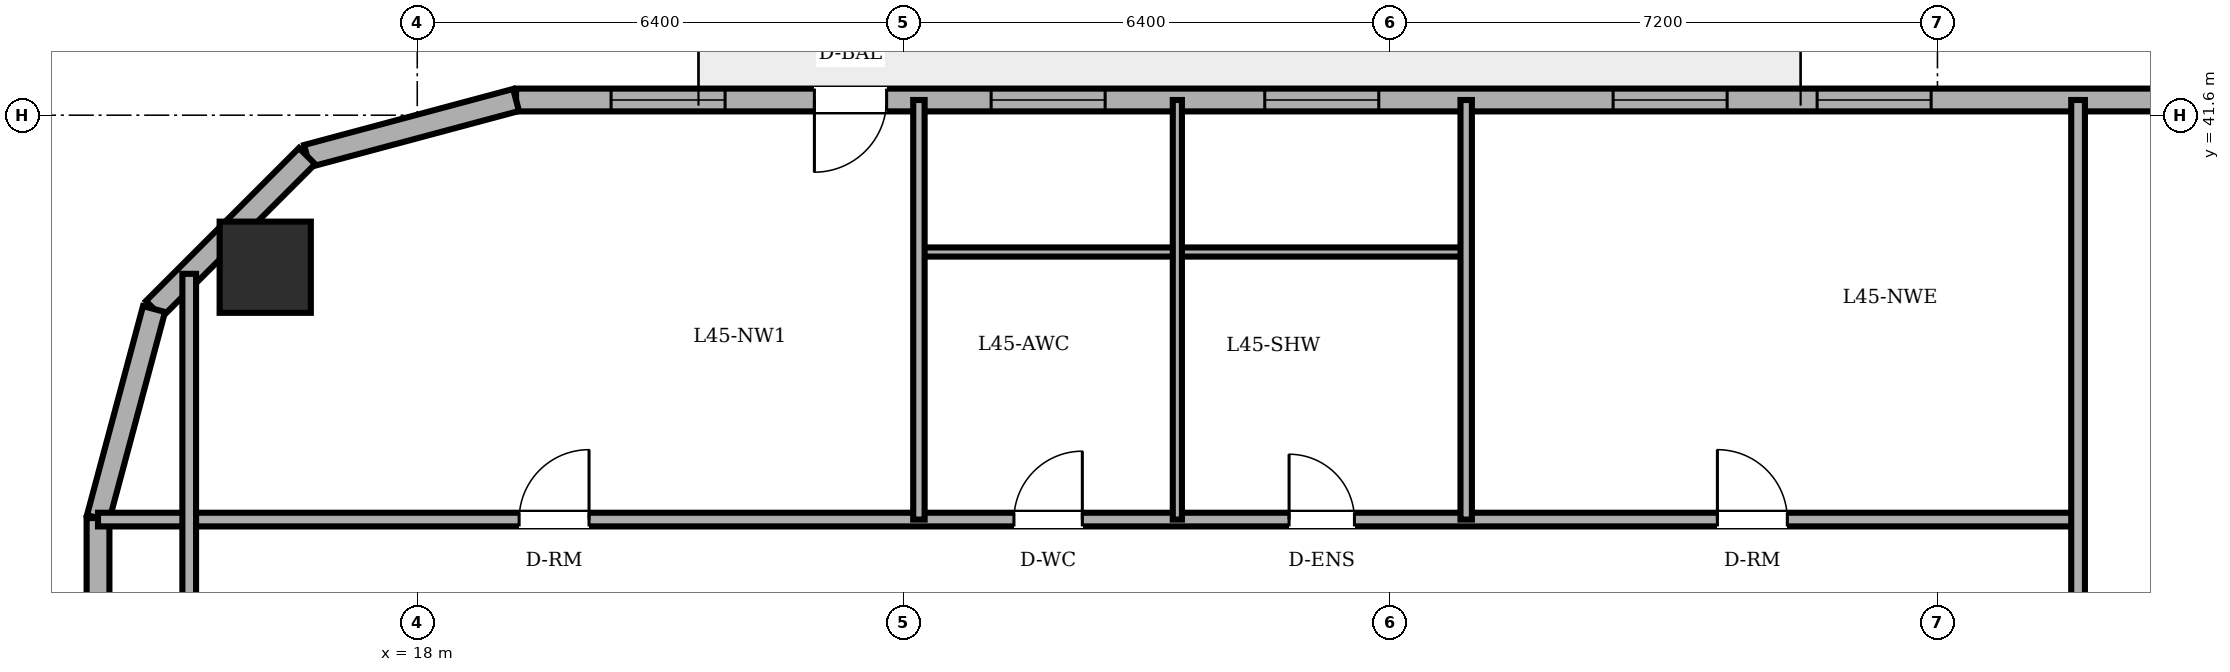
"""IFC4 building model, lengths in metres.
Left out: names, types, materials, properties, quantities, classifications, styles, units other than length and angle.
Written with IfcOpenShell. Run it as: python <this file> out.ifc"""

import sys

from ifc_helpers import new_model, si_unit, direction, frame, frame_2d, origin, origin_2d, place, context, subcontext, project, spatial, rectangle, circle, extrude, element, fill, save


model = new_model("IFC4")
c1 = context("Model", 3, precision=1e-05, world=origin(), true_north=direction((0.0, 1.0)))
c2 = subcontext(c1, "Body", "Model", "MODEL_VIEW")
j1 = project(units=[si_unit("LENGTHUNIT", "METRE"), si_unit("PLANEANGLEUNIT", "RADIAN")], contexts=[c1])
p1 = place(None, origin())
s1 = spatial("IfcSite", under=j1, at=p1, CompositionType="ELEMENT")
p2 = place(p1, origin())
s2 = spatial("IfcBuilding", under=s1, at=p2, CompositionType="ELEMENT")
p3 = place(p2, frame((0.0, 0.0, 172.6)))
s3 = spatial("IfcBuildingStorey", under=s2, at=p3, CompositionType="ELEMENT", Elevation=172.6)
p4 = place(p3, frame((16.0, 39.6, 0.0), z_axis=(0.0, 0.0, 1.0), x_axis=(1.0, 0.0, 0.0)))
e1 = element("IfcColumn", 1, at=p4, inside=s3, PredefinedType="COLUMN", context=c2, shape_type="SweptSolid", body=[
    extrude(circle(Radius=0.6, at=origin_2d()), origin(), (0.0, 0.0, 1.0), 3.6),
])
p5 = place(p3, frame((49.582, 41.8, 0.0), z_axis=(0.0, 0.0, 1.0), x_axis=(-1.0, 0.0, 0.0)))
e2 = element("IfcWall", 2, at=p5, inside=s3, PredefinedType="SOLIDWALL", context=c2, shape_type="SweptSolid", body=[
    extrude(rectangle(XDim=30.282, YDim=0.3, at=frame_2d((15.141, 0.0))), origin(), (0.0, 0.0, 1.0), 3.4),
])
p6 = place(p5, frame((25.407, 0.0, 0.0)))
e3 = element("IfcOpeningElement", 3, at=p6, cuts=e2, PredefinedType="OPENING", context=c2, shape_type="SweptSolid", body=[
    extrude(rectangle(XDim=0.95, YDim=2.2, at=frame_2d((0.475, 1.1))), frame((0.0, 0.16, 0.0), z_axis=(0.0, -1.0, 0.0), x_axis=(1.0, 0.0, 0.0)), (0.0, 0.0, 1.0), 0.32),
])
p7 = place(p5, frame((2.727, 0.0, 0.85)))
e4 = element("IfcOpeningElement", 4, at=p7, cuts=e2, PredefinedType="OPENING", context=c2, shape_type="SweptSolid", body=[
    extrude(rectangle(XDim=1.5, YDim=1.55, at=frame_2d((0.75, 0.775))), frame((0.0, 0.16, 0.0), z_axis=(0.0, -1.0, 0.0), x_axis=(1.0, 0.0, 0.0)), (0.0, 0.0, 1.0), 0.32),
])
p8 = place(p5, frame((5.855, 0.0, 0.85)))
e5 = element("IfcOpeningElement", 5, at=p8, cuts=e2, PredefinedType="OPENING", context=c2, shape_type="SweptSolid", body=[
    extrude(rectangle(XDim=1.5, YDim=1.55, at=frame_2d((0.75, 0.775))), frame((0.0, 0.16, 0.0), z_axis=(0.0, -1.0, 0.0), x_axis=(1.0, 0.0, 0.0)), (0.0, 0.0, 1.0), 0.32),
])
p9 = place(p5, frame((11.665, 0.0, 0.85)))
e6 = element("IfcOpeningElement", 6, at=p9, cuts=e2, PredefinedType="OPENING", context=c2, shape_type="SweptSolid", body=[
    extrude(rectangle(XDim=1.5, YDim=1.55, at=frame_2d((0.75, 0.775))), frame((0.0, 0.16, 0.0), z_axis=(0.0, -1.0, 0.0), x_axis=(1.0, 0.0, 0.0)), (0.0, 0.0, 1.0), 0.32),
])
p10 = place(p5, frame((14.349, 0.0, 0.85)))
e7 = element("IfcOpeningElement", 7, at=p10, cuts=e2, PredefinedType="OPENING", context=c2, shape_type="SweptSolid", body=[
    extrude(rectangle(XDim=1.5, YDim=1.55, at=frame_2d((0.75, 0.775))), frame((0.0, 0.16, 0.0), z_axis=(0.0, -1.0, 0.0), x_axis=(1.0, 0.0, 0.0)), (0.0, 0.0, 1.0), 0.32),
])
p11 = place(p5, frame((18.932, 0.0, 0.85)))
e8 = element("IfcOpeningElement", 8, at=p11, cuts=e2, PredefinedType="OPENING", context=c2, shape_type="SweptSolid", body=[
    extrude(rectangle(XDim=1.5, YDim=1.55, at=frame_2d((0.75, 0.775))), frame((0.0, 0.16, 0.0), z_axis=(0.0, -1.0, 0.0), x_axis=(1.0, 0.0, 0.0)), (0.0, 0.0, 1.0), 0.32),
])
p12 = place(p5, frame((22.532, 0.0, 0.85)))
e9 = element("IfcOpeningElement", 9, at=p12, cuts=e2, PredefinedType="OPENING", context=c2, shape_type="SweptSolid", body=[
    extrude(rectangle(XDim=1.5, YDim=1.55, at=frame_2d((0.75, 0.775))), frame((0.0, 0.16, 0.0), z_axis=(0.0, -1.0, 0.0), x_axis=(1.0, 0.0, 0.0)), (0.0, 0.0, 1.0), 0.32),
])
p13 = place(p5, frame((27.532, 0.0, 0.85)))
e10 = element("IfcOpeningElement", 10, at=p13, cuts=e2, PredefinedType="OPENING", context=c2, shape_type="SweptSolid", body=[
    extrude(rectangle(XDim=1.5, YDim=1.55, at=frame_2d((0.75, 0.775))), frame((0.0, 0.16, 0.0), z_axis=(0.0, -1.0, 0.0), x_axis=(1.0, 0.0, 0.0)), (0.0, 0.0, 1.0), 0.32),
])
p14 = place(p3, frame((19.3, 41.8, 0.0), z_axis=(0.0, 0.0, 1.0), x_axis=(-0.965908238586, -0.258884674387, 0.0)))
e11 = element("IfcWall", 11, at=p14, inside=s3, PredefinedType="SOLIDWALL", context=c2, shape_type="SweptSolid", body=[
    extrude(rectangle(XDim=2.847, YDim=0.3, at=frame_2d((1.424, 0.0))), origin(), (0.0, 0.0, 1.0), 3.4),
])
p15 = place(p3, frame((16.55, 41.063, 0.0), z_axis=(0.0, 0.0, 1.0), x_axis=(-0.707106781187, -0.707106781187, 0.0)))
e12 = element("IfcWall", 12, at=p15, inside=s3, PredefinedType="SOLIDWALL", context=c2, shape_type="SweptSolid", body=[
    extrude(rectangle(XDim=2.847, YDim=0.3, at=frame_2d((1.423, 0.0))), origin(), (0.0, 0.0, 1.0), 3.4),
])
p16 = place(p3, frame((14.537, 39.05, 0.0), z_axis=(0.0, 0.0, 1.0), x_axis=(-0.258884674387, -0.965908238586, 0.0)))
e13 = element("IfcWall", 13, at=p16, inside=s3, PredefinedType="SOLIDWALL", context=c2, shape_type="SweptSolid", body=[
    extrude(rectangle(XDim=2.847, YDim=0.3, at=frame_2d((1.424, 0.0))), origin(), (0.0, 0.0, 1.0), 3.4),
])
p17 = place(p3, frame((13.8, 36.3, 0.0), z_axis=(0.0, 0.0, 1.0), x_axis=(0.0, -1.0, 0.0)))
e14 = element("IfcWall", 14, at=p17, inside=s3, PredefinedType="SOLIDWALL", context=c2, shape_type="SweptSolid", body=[
    extrude(rectangle(XDim=24.6, YDim=0.3, at=frame_2d((12.3, 0.0))), origin(), (0.0, 0.0, 1.0), 3.4),
])
p18 = place(p17, frame((5.003, 0.0, 0.85)))
e15 = element("IfcOpeningElement", 15, at=p18, cuts=e14, PredefinedType="OPENING", context=c2, shape_type="SweptSolid", body=[
    extrude(rectangle(XDim=1.5, YDim=1.55, at=frame_2d((0.75, 0.775))), frame((0.0, 0.16, 0.0), z_axis=(0.0, -1.0, 0.0), x_axis=(1.0, 0.0, 0.0)), (0.0, 0.0, 1.0), 0.32),
])
p19 = place(p17, frame((8.277, 0.0, 0.85)))
e16 = element("IfcOpeningElement", 16, at=p19, cuts=e14, PredefinedType="OPENING", context=c2, shape_type="SweptSolid", body=[
    extrude(rectangle(XDim=1.5, YDim=1.55, at=frame_2d((0.75, 0.775))), frame((0.0, 0.16, 0.0), z_axis=(0.0, -1.0, 0.0), x_axis=(1.0, 0.0, 0.0)), (0.0, 0.0, 1.0), 0.32),
])
p20 = place(p17, frame((14.823, 0.0, 0.85)))
e17 = element("IfcOpeningElement", 17, at=p20, cuts=e14, PredefinedType="OPENING", context=c2, shape_type="SweptSolid", body=[
    extrude(rectangle(XDim=1.5, YDim=1.55, at=frame_2d((0.75, 0.775))), frame((0.0, 0.16, 0.0), z_axis=(0.0, -1.0, 0.0), x_axis=(1.0, 0.0, 0.0)), (0.0, 0.0, 1.0), 0.32),
])
p21 = place(p17, frame((18.097, 0.0, 0.85)))
e18 = element("IfcOpeningElement", 18, at=p21, cuts=e14, PredefinedType="OPENING", context=c2, shape_type="SweptSolid", body=[
    extrude(rectangle(XDim=1.5, YDim=1.55, at=frame_2d((0.75, 0.775))), frame((0.0, 0.16, 0.0), z_axis=(0.0, -1.0, 0.0), x_axis=(1.0, 0.0, 0.0)), (0.0, 0.0, 1.0), 0.32),
])
p22 = place(p3, frame((13.8, 36.28, 0.0), z_axis=(0.0, 0.0, 1.0), x_axis=(1.0, 0.0, 0.0)))
e19 = element("IfcWall", 19, at=p22, inside=s3, PredefinedType="PARTITIONING", context=c2, shape_type="SweptSolid", body=[
    extrude(rectangle(XDim=26.05, YDim=0.18, at=frame_2d((13.025, 0.0))), origin(), (0.0, 0.0, 1.0), 3.4),
])
p23 = place(p22, frame((12.05, 0.0, 0.0)))
e20 = element("IfcOpeningElement", 20, at=p23, cuts=e19, PredefinedType="OPENING", context=c2, shape_type="SweptSolid", body=[
    extrude(rectangle(XDim=0.9, YDim=2.1, at=frame_2d((0.45, 1.05))), frame((0.0, 0.1, 0.0), z_axis=(0.0, -1.0, 0.0), x_axis=(1.0, 0.0, 0.0)), (0.0, 0.0, 1.0), 0.2),
])
p24 = place(p22, frame((15.67, 0.0, 0.0)))
e21 = element("IfcOpeningElement", 21, at=p24, cuts=e19, PredefinedType="OPENING", context=c2, shape_type="SweptSolid", body=[
    extrude(rectangle(XDim=0.86, YDim=2.1, at=frame_2d((0.43, 1.05))), frame((0.0, 0.1, 0.0), z_axis=(0.0, -1.0, 0.0), x_axis=(1.0, 0.0, 0.0)), (0.0, 0.0, 1.0), 0.2),
])
p25 = place(p22, frame((5.54, 0.0, 0.0)))
e22 = element("IfcOpeningElement", 22, at=p25, cuts=e19, PredefinedType="OPENING", context=c2, shape_type="SweptSolid", body=[
    extrude(rectangle(XDim=0.92, YDim=2.1, at=frame_2d((0.46, 1.05))), frame((0.0, 0.1, 0.0), z_axis=(0.0, -1.0, 0.0), x_axis=(1.0, 0.0, 0.0)), (0.0, 0.0, 1.0), 0.2),
])
p26 = place(p22, frame((21.305, 0.0, 0.0)))
e23 = element("IfcOpeningElement", 23, at=p26, cuts=e19, PredefinedType="OPENING", context=c2, shape_type="SweptSolid", body=[
    extrude(rectangle(XDim=0.92, YDim=2.1, at=frame_2d((0.46, 1.05))), frame((0.0, 0.1, 0.0), z_axis=(0.0, -1.0, 0.0), x_axis=(1.0, 0.0, 0.0)), (0.0, 0.0, 1.0), 0.2),
])
p27 = place(p3, frame((24.6, 39.8, 0.0), z_axis=(0.0, 0.0, 1.0), x_axis=(1.0, 0.0, 0.0)))
e24 = element("IfcWall", 24, at=p27, inside=s3, PredefinedType="PARTITIONING", context=c2, shape_type="SweptSolid", body=[
    extrude(rectangle(XDim=7.2, YDim=0.12, at=frame_2d((3.6, 0.0))), origin(), (0.0, 0.0, 1.0), 2.882),
])
p28 = place(p3, frame((15.0, 33.82, 0.0), z_axis=(0.0, 0.0, 1.0), x_axis=(0.0, 1.0, 0.0)))
e25 = element("IfcWall", 25, at=p28, inside=s3, PredefinedType="PARTITIONING", context=c2, shape_type="SweptSolid", body=[
    extrude(rectangle(XDim=5.693, YDim=0.18, at=frame_2d((2.846, 0.0))), origin(), (0.0, 0.0, 1.0), 3.4),
])
p29 = place(p3, frame((24.6, 36.28, 0.0), z_axis=(0.0, 0.0, 1.0), x_axis=(0.0, 1.0, 0.0)))
e26 = element("IfcWall", 26, at=p29, inside=s3, PredefinedType="PARTITIONING", context=c2, shape_type="SweptSolid", body=[
    extrude(rectangle(XDim=5.52, YDim=0.15, at=frame_2d((2.76, 0.0))), origin(), (0.0, 0.0, 1.0), 3.4),
])
p30 = place(p3, frame((28.0, 36.28, 0.0), z_axis=(0.0, 0.0, 1.0), x_axis=(0.0, 1.0, 0.0)))
e27 = element("IfcWall", 27, at=p30, inside=s3, PredefinedType="PARTITIONING", context=c2, shape_type="SweptSolid", body=[
    extrude(rectangle(XDim=5.52, YDim=0.12, at=frame_2d((2.76, 0.0))), origin(), (0.0, 0.0, 1.0), 3.4),
])
p31 = place(p3, frame((31.8, 36.28, 0.0), z_axis=(0.0, 0.0, 1.0), x_axis=(0.0, 1.0, 0.0)))
e28 = element("IfcWall", 28, at=p31, inside=s3, PredefinedType="PARTITIONING", context=c2, shape_type="SweptSolid", body=[
    extrude(rectangle(XDim=5.52, YDim=0.15, at=frame_2d((2.76, 0.0))), origin(), (0.0, 0.0, 1.0), 3.4),
])
p32 = place(p3, frame((39.85, 14.18, 0.0), z_axis=(0.0, 0.0, 1.0), x_axis=(0.0, 1.0, 0.0)))
e29 = element("IfcWall", 29, at=p32, inside=s3, PredefinedType="PARTITIONING", context=c2, shape_type="SweptSolid", body=[
    extrude(rectangle(XDim=27.62, YDim=0.18, at=frame_2d((13.81, 0.0))), origin(), (0.0, 0.0, 1.0), 3.4),
])
p33 = place(p32, frame((14.47, 0.0, 0.0)))
e30 = element("IfcOpeningElement", 30, at=p33, cuts=e29, PredefinedType="OPENING", context=c2, shape_type="SweptSolid", body=[
    extrude(rectangle(XDim=0.92, YDim=2.1, at=frame_2d((0.46, 1.05))), frame((0.0, 0.1, 0.0), z_axis=(0.0, -1.0, 0.0), x_axis=(1.0, 0.0, 0.0)), (0.0, 0.0, 1.0), 0.2),
])
p34 = place(p6, origin())
e31 = element("IfcDoor", 31, at=p34, inside=s3, OperationType="SINGLE_SWING_RIGHT", PredefinedType="DOOR", context=c2, shape_type="SweptSolid", body=[
    extrude(rectangle(XDim=0.95, YDim=2.2, at=frame_2d((0.475, 1.1))), frame((0.0, 0.025, 0.0), z_axis=(0.0, -1.0, 0.0), x_axis=(1.0, 0.0, 0.0)), (0.0, 0.0, 1.0), 0.05),
])
fill(e3, e31)
p35 = place(p9, origin())
e32 = element("IfcWindow", 32, at=p35, inside=s3, PartitioningType="DOUBLE_PANEL_VERTICAL", PredefinedType="WINDOW", context=c2, shape_type="SweptSolid", body=[
    extrude(rectangle(XDim=1.5, YDim=1.55, at=frame_2d((0.75, 0.775))), frame((0.0, 0.03, 0.0), z_axis=(0.0, -1.0, 0.0), x_axis=(1.0, 0.0, 0.0)), (0.0, 0.0, 1.0), 0.06),
])
fill(e6, e32)
p36 = place(p10, origin())
e33 = element("IfcWindow", 33, at=p36, inside=s3, PartitioningType="DOUBLE_PANEL_VERTICAL", PredefinedType="WINDOW", context=c2, shape_type="SweptSolid", body=[
    extrude(rectangle(XDim=1.5, YDim=1.55, at=frame_2d((0.75, 0.775))), frame((0.0, 0.03, 0.0), z_axis=(0.0, -1.0, 0.0), x_axis=(1.0, 0.0, 0.0)), (0.0, 0.0, 1.0), 0.06),
])
fill(e7, e33)
p37 = place(p11, origin())
e34 = element("IfcWindow", 34, at=p37, inside=s3, PartitioningType="DOUBLE_PANEL_VERTICAL", PredefinedType="WINDOW", context=c2, shape_type="SweptSolid", body=[
    extrude(rectangle(XDim=1.5, YDim=1.55, at=frame_2d((0.75, 0.775))), frame((0.0, 0.03, 0.0), z_axis=(0.0, -1.0, 0.0), x_axis=(1.0, 0.0, 0.0)), (0.0, 0.0, 1.0), 0.06),
])
fill(e8, e34)
p38 = place(p12, origin())
e35 = element("IfcWindow", 35, at=p38, inside=s3, PartitioningType="DOUBLE_PANEL_VERTICAL", PredefinedType="WINDOW", context=c2, shape_type="SweptSolid", body=[
    extrude(rectangle(XDim=1.5, YDim=1.55, at=frame_2d((0.75, 0.775))), frame((0.0, 0.03, 0.0), z_axis=(0.0, -1.0, 0.0), x_axis=(1.0, 0.0, 0.0)), (0.0, 0.0, 1.0), 0.06),
])
fill(e9, e35)
p39 = place(p13, origin())
e36 = element("IfcWindow", 36, at=p39, inside=s3, PartitioningType="DOUBLE_PANEL_VERTICAL", PredefinedType="WINDOW", context=c2, shape_type="SweptSolid", body=[
    extrude(rectangle(XDim=1.5, YDim=1.55, at=frame_2d((0.75, 0.775))), frame((0.0, 0.03, 0.0), z_axis=(0.0, -1.0, 0.0), x_axis=(1.0, 0.0, 0.0)), (0.0, 0.0, 1.0), 0.06),
])
fill(e10, e36)
p40 = place(p23, origin())
e37 = element("IfcDoor", 37, at=p40, inside=s3, OperationType="SINGLE_SWING_RIGHT", PredefinedType="DOOR", context=c2, shape_type="SweptSolid", body=[
    extrude(rectangle(XDim=0.9, YDim=2.1, at=frame_2d((0.45, 1.05))), frame((0.0, 0.025, 0.0), z_axis=(0.0, -1.0, 0.0), x_axis=(1.0, 0.0, 0.0)), (0.0, 0.0, 1.0), 0.05),
])
fill(e20, e37)
p41 = place(p24, origin())
e38 = element("IfcDoor", 38, at=p41, inside=s3, OperationType="SINGLE_SWING_LEFT", PredefinedType="DOOR", context=c2, shape_type="SweptSolid", body=[
    extrude(rectangle(XDim=0.86, YDim=2.1, at=frame_2d((0.43, 1.05))), frame((0.0, 0.025, 0.0), z_axis=(0.0, -1.0, 0.0), x_axis=(1.0, 0.0, 0.0)), (0.0, 0.0, 1.0), 0.05),
])
fill(e21, e38)
p42 = place(p25, origin())
e39 = element("IfcDoor", 39, at=p42, inside=s3, OperationType="SINGLE_SWING_RIGHT", PredefinedType="DOOR", context=c2, shape_type="SweptSolid", body=[
    extrude(rectangle(XDim=0.92, YDim=2.1, at=frame_2d((0.46, 1.05))), frame((0.0, 0.025, 0.0), z_axis=(0.0, -1.0, 0.0), x_axis=(1.0, 0.0, 0.0)), (0.0, 0.0, 1.0), 0.05),
])
fill(e22, e39)
p43 = place(p26, origin())
e40 = element("IfcDoor", 40, at=p43, inside=s3, OperationType="SINGLE_SWING_LEFT", PredefinedType="DOOR", context=c2, shape_type="SweptSolid", body=[
    extrude(rectangle(XDim=0.92, YDim=2.1, at=frame_2d((0.46, 1.05))), frame((0.0, 0.025, 0.0), z_axis=(0.0, -1.0, 0.0), x_axis=(1.0, 0.0, 0.0)), (0.0, 0.0, 1.0), 0.05),
])
fill(e23, e40)
save(model, sys.argv[1])
